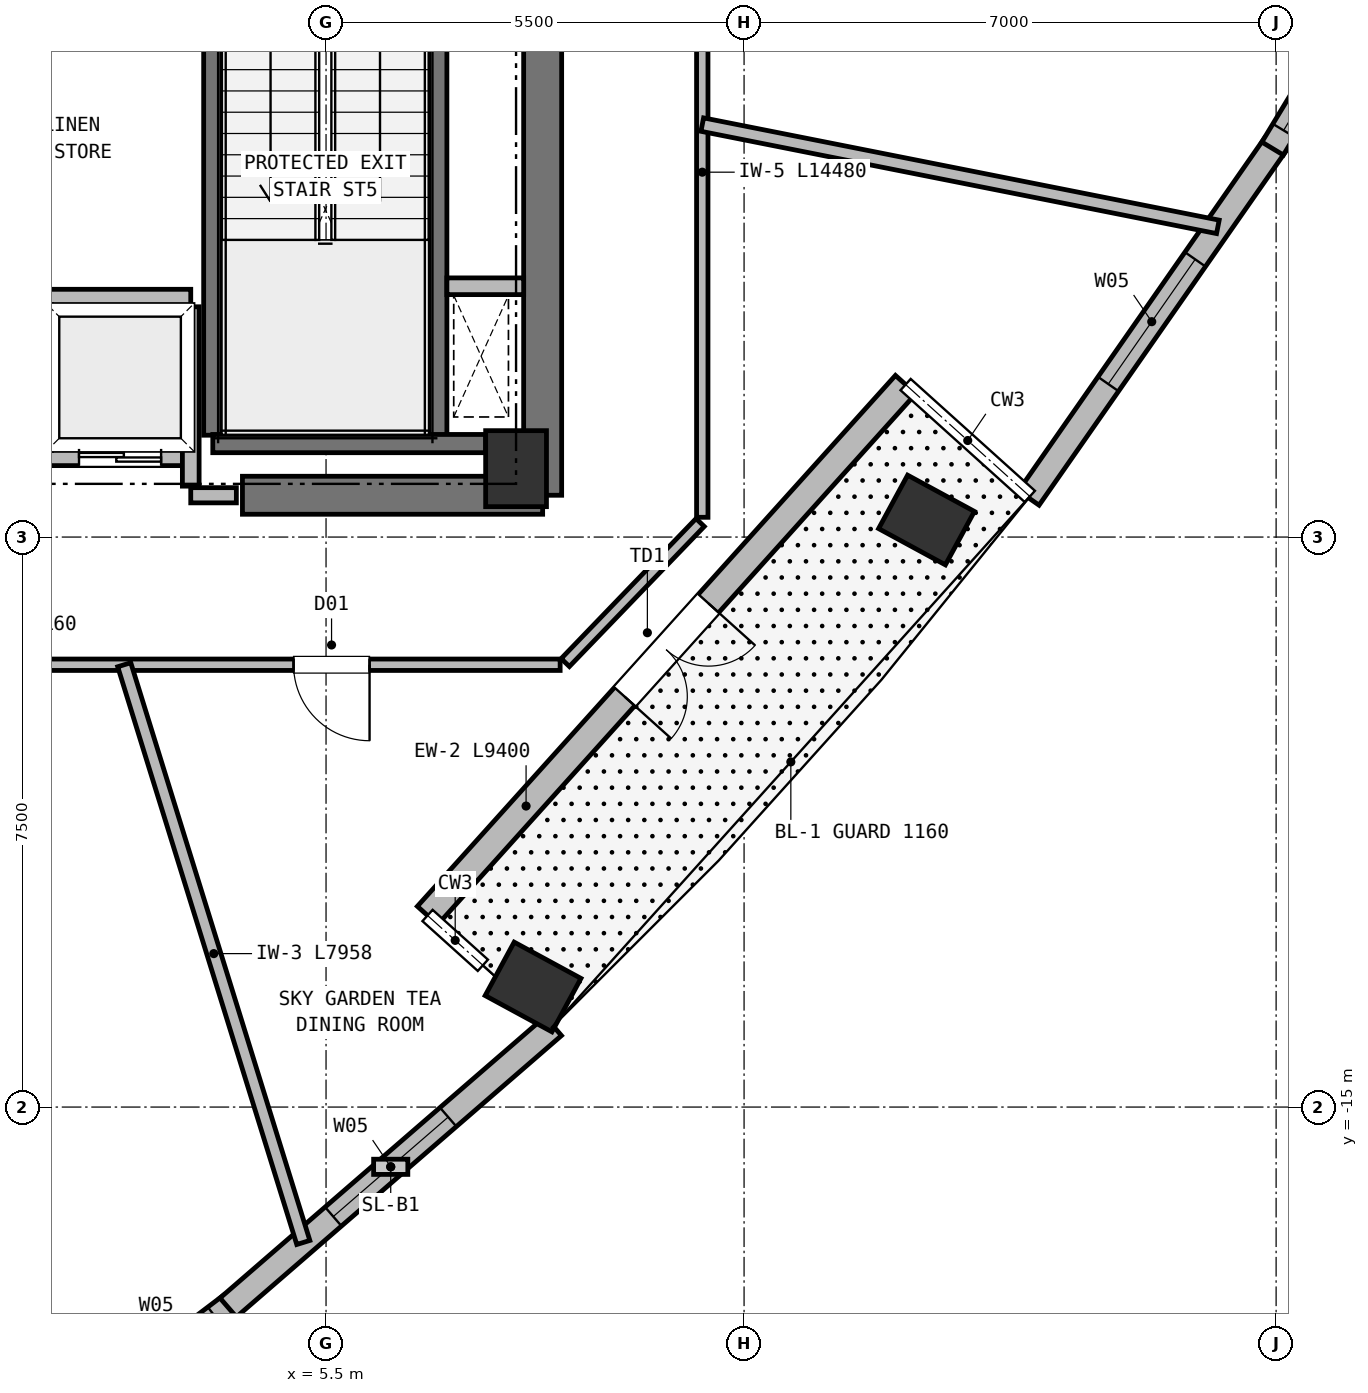
"""IFC4 building model, lengths in metres.
Left out: names, types, materials, properties, quantities, classifications, styles, units other than length and angle.
Written with IfcOpenShell. Run it as: python <this file> out.ifc"""

import sys

from ifc_helpers import new_model, si_unit, direction, frame, frame_2d, origin, origin_2d, place, context, subcontext, project, spatial, rectangle, extrude, element, fill, save


model = new_model("IFC4")
c1 = context("Model", 3, precision=1e-05, world=origin(), true_north=direction((0.0, 1.0)))
c2 = subcontext(c1, "Body", "Model", "MODEL_VIEW")
j1 = project(units=[si_unit("LENGTHUNIT", "METRE"), si_unit("PLANEANGLEUNIT", "RADIAN")], contexts=[c1])
p1 = place(None, origin())
s1 = spatial("IfcSite", under=j1, at=p1, CompositionType="ELEMENT")
p2 = place(p1, origin())
s2 = spatial("IfcBuilding", under=s1, at=p2, CompositionType="ELEMENT")
p3 = place(p2, frame((0.0, 0.0, 173.75)))
s3 = spatial("IfcBuildingStorey", under=s2, at=p3, CompositionType="ELEMENT", Elevation=173.75)
p4 = place(p3, frame((8.0, -6.6, 0.0), z_axis=(0.0, 0.0, 1.0), x_axis=(1.0, 0.0, 0.0)))
e1 = element("IfcColumn", 1, at=p4, inside=s3, PredefinedType="COLUMN", context=c2, shape_type="SweptSolid", body=[
    extrude(rectangle(XDim=0.8, YDim=1.0, at=origin_2d()), origin(), (0.0, 0.0, 1.0), 4.5),
])
p5 = place(p3, frame((4.4, -6.95, 0.0), z_axis=(0.0, 0.0, 1.0), x_axis=(1.0, 0.0, 0.0)))
e2 = element("IfcWall", 2, at=p5, inside=s3, PredefinedType="SHEAR", context=c2, shape_type="SweptSolid", body=[
    extrude(rectangle(XDim=3.95, YDim=0.5, at=frame_2d((1.975, 0.0))), origin(), (0.0, 0.0, 1.0), 4.21),
])
p6 = place(p3, frame((8.35, -6.95, 0.0), z_axis=(0.0, 0.0, 1.0), x_axis=(0.0, 1.0, 0.0)))
e3 = element("IfcWall", 3, at=p6, inside=s3, PredefinedType="SHEAR", context=c2, shape_type="SweptSolid", body=[
    extrude(rectangle(XDim=8.1, YDim=0.5, at=frame_2d((4.05, 0.0))), origin(), (0.0, 0.0, 1.0), 4.21),
])
for number, where, z_axis, x_axis in (
    (4, (8.224, -13.42, 0.0), (0.0, 0.0, 1.0), (0.477, 0.879, 0.0)),
    (5, (13.4, -7.276, 0.0), (0.0, 0.0, 1.0), (0.477, 0.879, 0.0)),
):
    element("IfcColumn", number, at=place(p3, frame(where, z_axis=z_axis, x_axis=x_axis)), inside=s3, PredefinedType="COLUMN", context=c2, shape_type="SweptSolid", body=[
        extrude(rectangle(XDim=0.8, YDim=1.0, at=origin_2d()), origin(), (0.0, 0.0, 1.0), 4.5),
    ])
p7 = place(p3, frame((13.125, -5.494, 0.0), z_axis=(0.0, 0.0, 1.0), x_axis=(-0.669139779012, -0.743136566281, 0.0)))
e6 = element("IfcWall", 6, at=p7, inside=s3, PredefinedType="SOLIDWALL", context=c2, shape_type="SweptSolid", body=[
    extrude(rectangle(XDim=9.4, YDim=0.36, at=frame_2d((4.7, 0.0))), origin(), (0.0, 0.0, 1.0), 3.89),
])
p8 = place(p7, frame((3.875, 0.0, 0.0)))
e7 = element("IfcOpeningElement", 7, at=p8, cuts=e6, PredefinedType="OPENING", context=c2, shape_type="SweptSolid", body=[
    extrude(rectangle(XDim=1.65, YDim=2.25, at=frame_2d((0.825, 1.125))), frame((0.0, 0.19, 0.0), z_axis=(0.0, -1.0, 0.0), x_axis=(1.0, 0.0, 0.0)), (0.0, 0.0, 1.0), 0.38),
])
p9 = place(p3, frame((4.252, -17.606, 0.0), z_axis=(0.0, 0.0, 1.0), x_axis=(-0.7968948115, -0.60411808399, 0.0)))
e8 = element("IfcWall", 8, at=p9, inside=s3, PredefinedType="SOLIDWALL", context=c2, shape_type="SweptSolid", body=[
    extrude(rectangle(XDim=2.509, YDim=0.33, at=frame_2d((1.254, 0.0))), origin(), (0.0, 0.0, 1.0), 4.21),
])
p10 = place(p9, frame((0.26, 0.0, 0.72)))
e9 = element("IfcOpeningElement", 9, at=p10, cuts=e8, PredefinedType="OPENING", context=c2, shape_type="SweptSolid", body=[
    extrude(rectangle(XDim=1.95, YDim=2.15, at=frame_2d((0.975, 1.075))), frame((0.0, 0.175, 0.0), z_axis=(0.0, -1.0, 0.0), x_axis=(1.0, 0.0, 0.0)), (0.0, 0.0, 1.0), 0.35),
])
p11 = place(p3, frame((8.489, -13.935, 0.0), z_axis=(0.0, 0.0, 1.0), x_axis=(-0.755999446819, -0.654572254536, 0.0)))
e10 = element("IfcWall", 10, at=p11, inside=s3, PredefinedType="SOLIDWALL", context=c2, shape_type="SweptSolid", body=[
    extrude(rectangle(XDim=5.656, YDim=0.33, at=frame_2d((2.828, 0.0))), origin(), (0.0, 0.0, 1.0), 4.21),
])
p12 = place(p11, frame((1.828, 0.0, 0.72)))
e11 = element("IfcOpeningElement", 11, at=p12, cuts=e10, PredefinedType="OPENING", context=c2, shape_type="SweptSolid", body=[
    extrude(rectangle(XDim=2.0, YDim=2.15, at=frame_2d((1.0, 1.075))), frame((0.0, 0.175, 0.0), z_axis=(0.0, -1.0, 0.0), x_axis=(1.0, 0.0, 0.0)), (0.0, 0.0, 1.0), 0.35),
])
p13 = place(p3, frame((17.981, -2.346, 0.0), z_axis=(0.0, 0.0, 1.0), x_axis=(-0.571969587154, -0.820274826733, 0.0)))
e12 = element("IfcWall", 12, at=p13, inside=s3, PredefinedType="SOLIDWALL", context=c2, shape_type="SweptSolid", body=[
    extrude(rectangle(XDim=5.656, YDim=0.33, at=frame_2d((2.828, 0.0))), origin(), (0.0, 0.0, 1.0), 4.21),
])
p14 = place(p13, frame((1.828, 0.0, 0.72)))
e13 = element("IfcOpeningElement", 13, at=p14, cuts=e12, PredefinedType="OPENING", context=c2, shape_type="SweptSolid", body=[
    extrude(rectangle(XDim=2.0, YDim=2.15, at=frame_2d((1.0, 1.075))), frame((0.0, 0.175, 0.0), z_axis=(0.0, -1.0, 0.0), x_axis=(1.0, 0.0, 0.0)), (0.0, 0.0, 1.0), 0.35),
])
p15 = place(p3, frame((19.252, -0.241, 0.0), z_axis=(0.0, 0.0, 1.0), x_axis=(-0.517483977519, -0.855692896436, 0.0)))
e14 = element("IfcWall", 14, at=p15, inside=s3, PredefinedType="SOLIDWALL", context=c2, shape_type="SweptSolid", body=[
    extrude(rectangle(XDim=2.509, YDim=0.33, at=frame_2d((1.254, 0.0))), origin(), (0.0, 0.0, 1.0), 4.21),
])
p16 = place(p15, frame((0.279, 0.0, 0.72)))
e15 = element("IfcOpeningElement", 15, at=p16, cuts=e14, PredefinedType="OPENING", context=c2, shape_type="SweptSolid", body=[
    extrude(rectangle(XDim=1.95, YDim=2.15, at=frame_2d((0.975, 1.075))), frame((0.0, 0.175, 0.0), z_axis=(0.0, -1.0, 0.0), x_axis=(1.0, 0.0, 0.0)), (0.0, 0.0, 1.0), 0.35),
])
for number, where, z_axis, x_axis in (
    (16, (4.01, -6.16, 0.0), (0.0, 0.0, 1.0), (0.0, 1.0, 0.0)),
    (17, (6.97, -6.16, 0.0), (0.0, 0.0, 1.0), (0.0, 1.0, 0.0)),
):
    element("IfcWall", number, at=place(p3, frame(where, z_axis=z_axis, x_axis=x_axis)), inside=s3, PredefinedType="SHEAR", context=c2, shape_type="SweptSolid", body=[
        extrude(rectangle(XDim=7.22, YDim=0.24, at=frame_2d((3.61, 0.0))), origin(), (0.0, 0.0, 1.0), 4.21),
    ])
p17 = place(p3, frame((4.01, -6.27, 0.0), z_axis=(0.0, 0.0, 1.0), x_axis=(1.0, 0.0, 0.0)))
e18 = element("IfcWall", 18, at=p17, inside=s3, PredefinedType="SHEAR", context=c2, shape_type="SweptSolid", body=[
    extrude(rectangle(XDim=3.59, YDim=0.24, at=frame_2d((1.795, 0.0))), origin(), (0.0, 0.0, 1.0), 4.21),
])
p18 = place(p3, frame((7.09, -4.2, 0.0), z_axis=(0.0, 0.0, 1.0), x_axis=(1.0, 0.0, 0.0)))
e19 = element("IfcWall", 19, at=p18, inside=s3, PredefinedType="PARTITIONING", context=c2, shape_type="SweptSolid", body=[
    extrude(rectangle(XDim=1.01, YDim=0.22, at=frame_2d((0.505, 0.0))), origin(), (0.0, 0.0, 1.0), 4.21),
])
p19 = place(p3, frame((1.86, -6.33, 0.0), z_axis=(0.0, 0.0, 1.0), x_axis=(0.0, 1.0, 0.0)))
e20 = element("IfcWall", 20, at=p19, inside=s3, PredefinedType="PARTITIONING", context=c2, shape_type="SweptSolid", body=[
    extrude(rectangle(XDim=1.86, YDim=0.22, at=frame_2d((0.93, 0.0))), origin(), (0.0, 0.0, 1.0), 4.21),
])
p20 = place(p3, frame((1.86, -6.45, 0.0), z_axis=(0.0, 0.0, 1.0), x_axis=(1.0, 0.0, 0.0)))
e21 = element("IfcWall", 21, at=p20, inside=s3, PredefinedType="PARTITIONING", context=c2, shape_type="SweptSolid", body=[
    extrude(rectangle(XDim=1.86, YDim=0.22, at=frame_2d((0.93, 0.0))), origin(), (0.0, 0.0, 1.0), 3.84),
])
p21 = place(p20, frame((0.39, 0.0, 0.0)))
e22 = element("IfcOpeningElement", 22, at=p21, cuts=e21, PredefinedType="OPENING", context=c2, shape_type="SweptSolid", body=[
    extrude(rectangle(XDim=1.08, YDim=2.15, at=frame_2d((0.54, 1.075))), frame((0.0, 0.12, 0.0), z_axis=(0.0, -1.0, 0.0), x_axis=(1.0, 0.0, 0.0)), (0.0, 0.0, 1.0), 0.24),
])
p22 = place(p3, frame((1.86, -4.35, 0.0), z_axis=(0.0, 0.0, 1.0), x_axis=(1.0, 0.0, 0.0)))
e23 = element("IfcWall", 23, at=p22, inside=s3, PredefinedType="PARTITIONING", context=c2, shape_type="SweptSolid", body=[
    extrude(rectangle(XDim=1.86, YDim=0.22, at=frame_2d((0.93, 0.0))), origin(), (0.0, 0.0, 1.0), 4.21),
])
p23 = place(p3, frame((3.72, -6.83, 0.0), z_axis=(0.0, 0.0, 1.0), x_axis=(0.0, 1.0, 0.0)))
e24 = element("IfcWall", 24, at=p23, inside=s3, PredefinedType="PARTITIONING", context=c2, shape_type="SweptSolid", body=[
    extrude(rectangle(XDim=2.36, YDim=0.22, at=frame_2d((1.18, 0.0))), origin(), (0.0, 0.0, 1.0), 4.21),
])
p24 = place(p3, frame((3.72, -6.95, 0.0), z_axis=(0.0, 0.0, 1.0), x_axis=(1.0, 0.0, 0.0)))
e25 = element("IfcWall", 25, at=p24, inside=s3, PredefinedType="PARTITIONING", context=c2, shape_type="SweptSolid", body=[
    extrude(rectangle(XDim=0.6, YDim=0.2, at=frame_2d((0.3, 0.0))), origin(), (0.0, 0.0, 1.0), 4.21),
])
p25 = place(p3, frame((8.58, -9.18, 0.0), z_axis=(0.0, 0.0, 1.0), x_axis=(-1.0, 0.0, 0.0)))
e26 = element("IfcWall", 26, at=p25, inside=s3, PredefinedType="PARTITIONING", context=c2, shape_type="SweptSolid", body=[
    extrude(rectangle(XDim=17.16, YDim=0.15, at=frame_2d((8.58, 0.0))), origin(), (0.0, 0.0, 1.0), 3.89),
])
p26 = place(p25, frame((2.507, 0.0, 0.0)))
e27 = element("IfcOpeningElement", 27, at=p26, cuts=e26, PredefinedType="OPENING", context=c2, shape_type="SweptSolid", body=[
    extrude(rectangle(XDim=1.0, YDim=2.15, at=frame_2d((0.5, 1.075))), frame((0.0, 0.085, 0.0), z_axis=(0.0, -1.0, 0.0), x_axis=(1.0, 0.0, 0.0)), (0.0, 0.0, 1.0), 0.17),
])
p27 = place(p25, frame((10.894, 0.0, 0.0)))
e28 = element("IfcOpeningElement", 28, at=p27, cuts=e26, PredefinedType="OPENING", context=c2, shape_type="SweptSolid", body=[
    extrude(rectangle(XDim=1.0, YDim=2.15, at=frame_2d((0.5, 1.075))), frame((0.0, 0.085, 0.0), z_axis=(0.0, -1.0, 0.0), x_axis=(1.0, 0.0, 0.0)), (0.0, 0.0, 1.0), 0.17),
])
p28 = place(p3, frame((10.422, -7.309, 0.0), z_axis=(0.0, 0.0, 1.0), x_axis=(-0.693764562202, -0.720201869085, 0.0)))
e29 = element("IfcWall", 29, at=p28, inside=s3, PredefinedType="PARTITIONING", context=c2, shape_type="SweptSolid", body=[
    extrude(rectangle(XDim=2.558, YDim=0.15, at=frame_2d((1.279, 0.0))), origin(), (0.0, 0.0, 1.0), 3.89),
])
p29 = place(p3, frame((10.45, 7.24, 0.0), z_axis=(0.0, 0.0, 1.0), x_axis=(0.0, -1.0, 0.0)))
e30 = element("IfcWall", 30, at=p29, inside=s3, PredefinedType="PARTITIONING", context=c2, shape_type="SweptSolid", body=[
    extrude(rectangle(XDim=14.48, YDim=0.15, at=frame_2d((7.24, 0.0))), origin(), (0.0, 0.0, 1.0), 4.21),
])
p30 = place(p29, frame((4.298, 0.0, 0.0)))
e31 = element("IfcOpeningElement", 31, at=p30, cuts=e30, PredefinedType="OPENING", context=c2, shape_type="SweptSolid", body=[
    extrude(rectangle(XDim=1.0, YDim=2.15, at=frame_2d((0.5, 1.075))), frame((0.0, 0.085, 0.0), z_axis=(0.0, -1.0, 0.0), x_axis=(1.0, 0.0, 0.0)), (0.0, 0.0, 1.0), 0.17),
])
p31 = place(p3, frame((2.845, -9.18, 0.0), z_axis=(0.0, 0.0, 1.0), x_axis=(0.296001653507, -0.955187427221, 0.0)))
e32 = element("IfcWall", 32, at=p31, inside=s3, PredefinedType="PARTITIONING", context=c2, shape_type="SweptSolid", body=[
    extrude(rectangle(XDim=7.958, YDim=0.18, at=frame_2d((3.979, 0.0))), origin(), (0.0, 0.0, 1.0), 4.21),
])
p32 = place(p3, frame((10.45, -2.073, 0.0), z_axis=(0.0, 0.0, 1.0), x_axis=(0.980886326551, -0.194581639385, 0.0)))
e33 = element("IfcWall", 33, at=p32, inside=s3, PredefinedType="PARTITIONING", context=c2, shape_type="SweptSolid", body=[
    extrude(rectangle(XDim=6.916, YDim=0.18, at=frame_2d((3.458, 0.0))), origin(), (0.0, 0.0, 1.0), 4.21),
])
p33 = place(p8, origin())
e34 = element("IfcDoor", 34, at=p33, inside=s3, OperationType="DOUBLE_DOOR_SINGLE_SWING", PredefinedType="DOOR", context=c2, shape_type="SweptSolid", body=[
    extrude(rectangle(XDim=1.65, YDim=2.25, at=frame_2d((0.825, 1.125))), frame((0.0, 0.025, 0.0), z_axis=(0.0, -1.0, 0.0), x_axis=(1.0, 0.0, 0.0)), (0.0, 0.0, 1.0), 0.05),
])
fill(e7, e34)
p34 = place(p12, origin())
e35 = element("IfcWindow", 35, at=p34, inside=s3, PartitioningType="SINGLE_PANEL", PredefinedType="WINDOW", context=c2, shape_type="SweptSolid", body=[
    extrude(rectangle(XDim=2.0, YDim=2.15, at=frame_2d((1.0, 1.075))), frame((0.0, 0.03, 0.0), z_axis=(0.0, -1.0, 0.0), x_axis=(1.0, 0.0, 0.0)), (0.0, 0.0, 1.0), 0.06),
])
fill(e11, e35)
p35 = place(p14, origin())
e36 = element("IfcWindow", 36, at=p35, inside=s3, PartitioningType="SINGLE_PANEL", PredefinedType="WINDOW", context=c2, shape_type="SweptSolid", body=[
    extrude(rectangle(XDim=2.0, YDim=2.15, at=frame_2d((1.0, 1.075))), frame((0.0, 0.03, 0.0), z_axis=(0.0, -1.0, 0.0), x_axis=(1.0, 0.0, 0.0)), (0.0, 0.0, 1.0), 0.06),
])
fill(e13, e36)
p36 = place(p16, origin())
e37 = element("IfcWindow", 37, at=p36, inside=s3, PartitioningType="SINGLE_PANEL", PredefinedType="WINDOW", context=c2, shape_type="SweptSolid", body=[
    extrude(rectangle(XDim=1.95, YDim=2.15, at=frame_2d((0.975, 1.075))), frame((0.0, 0.03, 0.0), z_axis=(0.0, -1.0, 0.0), x_axis=(1.0, 0.0, 0.0)), (0.0, 0.0, 1.0), 0.06),
])
fill(e15, e37)
p37 = place(p21, origin())
e38 = element("IfcDoor", 38, at=p37, inside=s3, OperationType="DOUBLE_DOOR_SLIDING", PredefinedType="DOOR", context=c2, shape_type="SweptSolid", body=[
    extrude(rectangle(XDim=1.08, YDim=2.15, at=frame_2d((0.54, 1.075))), frame((0.0, 0.025, 0.0), z_axis=(0.0, -1.0, 0.0), x_axis=(1.0, 0.0, 0.0)), (0.0, 0.0, 1.0), 0.05),
])
fill(e22, e38)
p38 = place(p26, origin())
e39 = element("IfcDoor", 39, at=p38, inside=s3, OperationType="SINGLE_SWING_LEFT", PredefinedType="DOOR", context=c2, shape_type="SweptSolid", body=[
    extrude(rectangle(XDim=1.0, YDim=2.15, at=frame_2d((0.5, 1.075))), frame((0.0, 0.025, 0.0), z_axis=(0.0, -1.0, 0.0), x_axis=(1.0, 0.0, 0.0)), (0.0, 0.0, 1.0), 0.05),
])
fill(e27, e39)
save(model, sys.argv[1])
